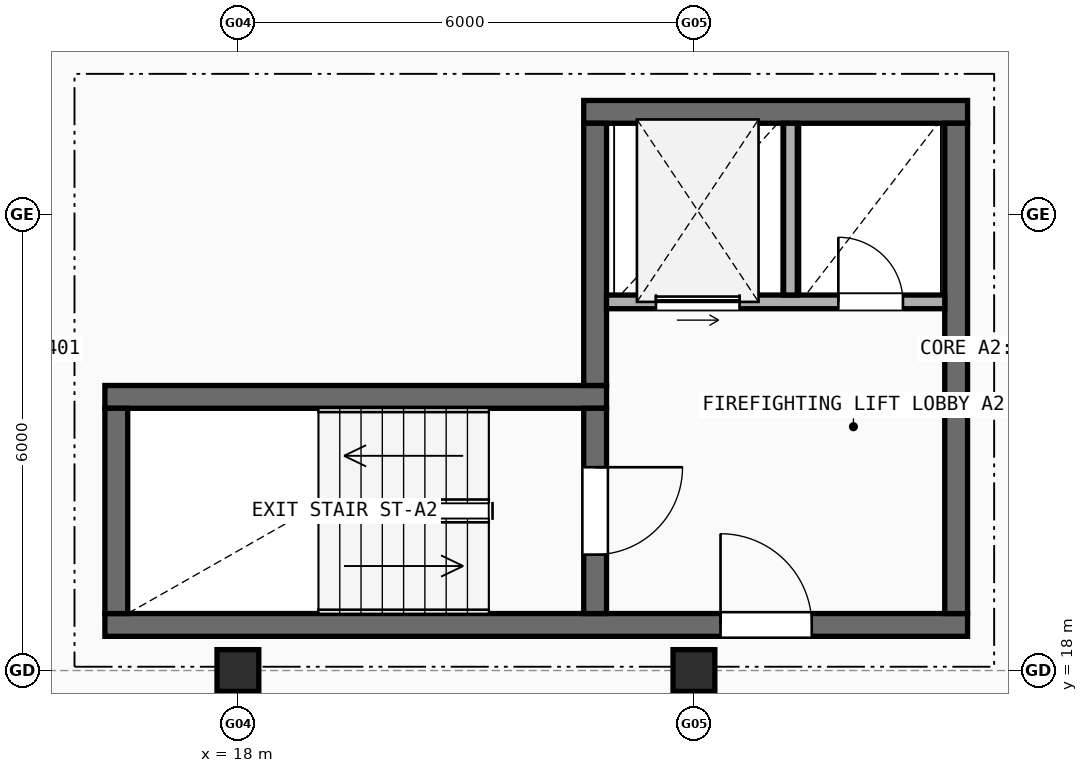
"""IFC4 building model, lengths in metres.
Left out: names, types, materials, properties, quantities, classifications, styles, units other than length and angle.
Written with IfcOpenShell. Run it as: python <this file> out.ifc"""

import sys

from ifc_helpers import new_model, si_unit, direction, frame, frame_2d, origin, origin_2d, place, context, subcontext, project, spatial, rectangle, extrude, element, fill, save


model = new_model("IFC4")
c1 = context("Model", 3, precision=1e-05, world=origin(), true_north=direction((0.0, 1.0)))
c2 = subcontext(c1, "Body", "Model", "MODEL_VIEW")
j1 = project(units=[si_unit("LENGTHUNIT", "METRE"), si_unit("PLANEANGLEUNIT", "RADIAN")], contexts=[c1])
p1 = place(None, origin())
s1 = spatial("IfcSite", under=j1, at=p1, CompositionType="ELEMENT")
p2 = place(p1, origin())
s2 = spatial("IfcBuilding", under=s1, at=p2, CompositionType="ELEMENT")
p3 = place(p2, frame((0.0, 0.0, 23.7)))
s3 = spatial("IfcBuildingStorey", under=s2, at=p3, CompositionType="ELEMENT", Elevation=23.7)
for number, where, z_axis, x_axis in (
    (1, (18.0, 18.0, 0.0), (0.0, 0.0, 1.0), (1.0, 0.0, 0.0)),
    (2, (24.0, 18.0, 0.0), (0.0, 0.0, 1.0), (1.0, 0.0, 0.0)),
):
    element("IfcColumn", number, at=place(p3, frame(where, z_axis=z_axis, x_axis=x_axis)), inside=s3, PredefinedType="COLUMN", context=c2, shape_type="SweptSolid", body=[
        extrude(rectangle(XDim=0.55, YDim=0.55, at=origin_2d()), origin(), (0.0, 0.0, 1.0), 2.975),
    ])
p4 = place(p3, frame((16.25, 18.6, 0.0), z_axis=(0.0, 0.0, 1.0), x_axis=(1.0, 0.0, 0.0)))
e3 = element("IfcWall", 3, at=p4, inside=s3, PredefinedType="SHEAR", context=c2, shape_type="SweptSolid", body=[
    extrude(rectangle(XDim=11.35, YDim=0.3, at=frame_2d((5.675, 0.0))), origin(), (0.0, 0.0, 1.0), 2.975),
])
p5 = place(p4, frame((8.1, 0.0, 0.0)))
e4 = element("IfcOpeningElement", 4, at=p5, cuts=e3, PredefinedType="OPENING", context=c2, shape_type="SweptSolid", body=[
    extrude(rectangle(XDim=1.2, YDim=2.15, at=frame_2d((0.6, 1.075))), frame((0.0, 0.16, 0.0), z_axis=(0.0, -1.0, 0.0), x_axis=(1.0, 0.0, 0.0)), (0.0, 0.0, 1.0), 0.32),
])
p6 = place(p3, frame((22.85, 21.6, 0.0), z_axis=(0.0, 0.0, 1.0), x_axis=(-1.0, 0.0, 0.0)))
e5 = element("IfcWall", 5, at=p6, inside=s3, PredefinedType="SHEAR", context=c2, shape_type="SweptSolid", body=[
    extrude(rectangle(XDim=6.6, YDim=0.3, at=frame_2d((3.3, 0.0))), origin(), (0.0, 0.0, 1.0), 2.975),
])
p7 = place(p3, frame((16.4, 21.45, 0.0), z_axis=(0.0, 0.0, 1.0), x_axis=(0.0, -1.0, 0.0)))
e6 = element("IfcWall", 6, at=p7, inside=s3, PredefinedType="SHEAR", context=c2, shape_type="SweptSolid", body=[
    extrude(rectangle(XDim=2.7, YDim=0.3, at=frame_2d((1.35, 0.0))), origin(), (0.0, 0.0, 1.0), 2.975),
])
p8 = place(p3, frame((22.7, 18.75, 0.0), z_axis=(0.0, 0.0, 1.0), x_axis=(0.0, 1.0, 0.0)))
e7 = element("IfcWall", 7, at=p8, inside=s3, PredefinedType="SHEAR", context=c2, shape_type="SweptSolid", body=[
    extrude(rectangle(XDim=2.7, YDim=0.3, at=frame_2d((1.35, 0.0))), origin(), (0.0, 0.0, 1.0), 2.975),
])
p9 = place(p8, frame((0.775, 0.0, 0.0)))
e8 = element("IfcOpeningElement", 8, at=p9, cuts=e7, PredefinedType="OPENING", context=c2, shape_type="SweptSolid", body=[
    extrude(rectangle(XDim=1.15, YDim=2.15, at=frame_2d((0.575, 1.075))), frame((0.0, 0.16, 0.0), z_axis=(0.0, -1.0, 0.0), x_axis=(1.0, 0.0, 0.0)), (0.0, 0.0, 1.0), 0.32),
])
p10 = place(p3, frame((27.6, 25.35, 0.0), z_axis=(0.0, 0.0, 1.0), x_axis=(-1.0, 0.0, 0.0)))
e9 = element("IfcWall", 9, at=p10, inside=s3, PredefinedType="SHEAR", context=c2, shape_type="SweptSolid", body=[
    extrude(rectangle(XDim=5.05, YDim=0.3, at=frame_2d((2.525, 0.0))), origin(), (0.0, 0.0, 1.0), 2.975),
])
p11 = place(p3, frame((27.45, 18.75, 0.0), z_axis=(0.0, 0.0, 1.0), x_axis=(0.0, 1.0, 0.0)))
e10 = element("IfcWall", 10, at=p11, inside=s3, PredefinedType="SHEAR", context=c2, shape_type="SweptSolid", body=[
    extrude(rectangle(XDim=6.45, YDim=0.3, at=frame_2d((3.225, 0.0))), origin(), (0.0, 0.0, 1.0), 2.975),
])
p12 = place(p3, frame((22.7, 21.75, 0.0), z_axis=(0.0, 0.0, 1.0), x_axis=(0.0, 1.0, 0.0)))
e11 = element("IfcWall", 11, at=p12, inside=s3, PredefinedType="SHEAR", context=c2, shape_type="SweptSolid", body=[
    extrude(rectangle(XDim=3.45, YDim=0.3, at=frame_2d((1.725, 0.0))), origin(), (0.0, 0.0, 1.0), 2.975),
])
p13 = place(p3, frame((22.85, 22.85, 0.0), z_axis=(0.0, 0.0, 1.0), x_axis=(1.0, 0.0, 0.0)))
e12 = element("IfcWall", 12, at=p13, inside=s3, PredefinedType="SOLIDWALL", context=c2, shape_type="SweptSolid", body=[
    extrude(rectangle(XDim=4.45, YDim=0.18, at=frame_2d((2.225, 0.0))), origin(), (0.0, 0.0, 1.0), 2.975),
])
p14 = place(p13, frame((0.65, 0.0, 0.0)))
e13 = element("IfcOpeningElement", 13, at=p14, cuts=e12, PredefinedType="OPENING", context=c2, shape_type="SweptSolid", body=[
    extrude(rectangle(XDim=1.1, YDim=2.15, at=frame_2d((0.55, 1.075))), frame((0.0, 0.1, 0.0), z_axis=(0.0, -1.0, 0.0), x_axis=(1.0, 0.0, 0.0)), (0.0, 0.0, 1.0), 0.2),
])
p15 = place(p13, frame((3.05, 0.0, 0.0)))
e14 = element("IfcOpeningElement", 14, at=p15, cuts=e12, PredefinedType="OPENING", context=c2, shape_type="SweptSolid", body=[
    extrude(rectangle(XDim=0.85, YDim=2.1, at=frame_2d((0.425, 1.05))), frame((0.0, 0.1, 0.0), z_axis=(0.0, -1.0, 0.0), x_axis=(1.0, 0.0, 0.0)), (0.0, 0.0, 1.0), 0.2),
])
p16 = place(p3, frame((25.27, 22.94, 0.0), z_axis=(0.0, 0.0, 1.0), x_axis=(0.0, 1.0, 0.0)))
e15 = element("IfcWall", 15, at=p16, inside=s3, PredefinedType="SOLIDWALL", context=c2, shape_type="SweptSolid", body=[
    extrude(rectangle(XDim=2.26, YDim=0.18, at=frame_2d((1.13, 0.0))), origin(), (0.0, 0.0, 1.0), 2.975),
])
p17 = place(p5, origin())
e16 = element("IfcDoor", 16, at=p17, inside=s3, OperationType="SINGLE_SWING_LEFT", PredefinedType="DOOR", context=c2, shape_type="SweptSolid", body=[
    extrude(rectangle(XDim=1.2, YDim=2.15, at=frame_2d((0.6, 1.075))), frame((0.0, 0.025, 0.0), z_axis=(0.0, -1.0, 0.0), x_axis=(1.0, 0.0, 0.0)), (0.0, 0.0, 1.0), 0.05),
])
fill(e4, e16)
p18 = place(p9, origin())
e17 = element("IfcDoor", 17, at=p18, inside=s3, OperationType="SINGLE_SWING_RIGHT", PredefinedType="DOOR", context=c2, shape_type="SweptSolid", body=[
    extrude(rectangle(XDim=1.15, YDim=2.15, at=frame_2d((0.575, 1.075))), frame((0.0, 0.025, 0.0), z_axis=(0.0, -1.0, 0.0), x_axis=(1.0, 0.0, 0.0)), (0.0, 0.0, 1.0), 0.05),
])
fill(e8, e17)
p19 = place(p14, origin())
e18 = element("IfcDoor", 18, at=p19, inside=s3, OperationType="SLIDING_TO_LEFT", PredefinedType="DOOR", context=c2, shape_type="SweptSolid", body=[
    extrude(rectangle(XDim=1.1, YDim=2.15, at=frame_2d((0.55, 1.075))), frame((0.0, 0.025, 0.0), z_axis=(0.0, -1.0, 0.0), x_axis=(1.0, 0.0, 0.0)), (0.0, 0.0, 1.0), 0.05),
])
fill(e13, e18)
p20 = place(p15, frame((0.85, 0.0, 0.0), z_axis=(0.0, 0.0, 1.0), x_axis=(-1.0, 0.0, 0.0)))
e19 = element("IfcDoor", 19, at=p20, inside=s3, OperationType="SINGLE_SWING_LEFT", PredefinedType="DOOR", context=c2, shape_type="SweptSolid", body=[
    extrude(rectangle(XDim=0.85, YDim=2.1, at=frame_2d((0.425, 1.05))), frame((0.0, 0.025, 0.0), z_axis=(0.0, -1.0, 0.0), x_axis=(1.0, 0.0, 0.0)), (0.0, 0.0, 1.0), 0.05),
])
fill(e14, e19)
save(model, sys.argv[1])
